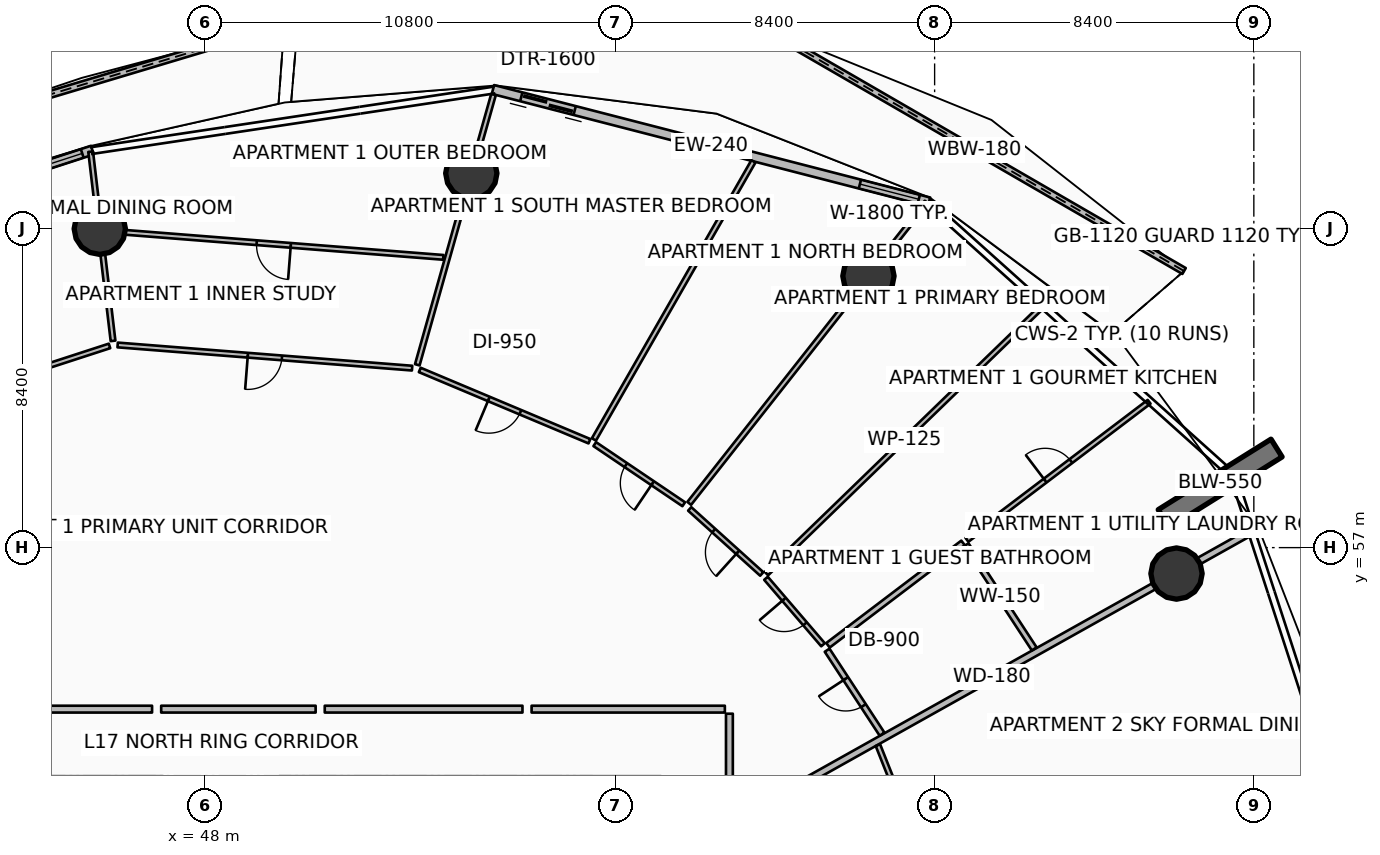
"""IFC4 building model, lengths in metres.
Left out: names, types, materials, properties, quantities, classifications, styles, units other than length and angle.
Written with IfcOpenShell. Run it as: python <this file> out.ifc"""

import sys

from ifc_helpers import new_model, si_unit, direction, frame, frame_2d, origin, origin_2d, place, context, subcontext, project, spatial, polyline, rectangle, circle, outline, extrude, element, fill, save


model = new_model("IFC4")
c1 = context("Model", 3, precision=1e-05, world=origin(), true_north=direction((0.0, 1.0)))
c2 = subcontext(c1, "Body", "Model", "MODEL_VIEW")
j1 = project(units=[si_unit("LENGTHUNIT", "METRE"), si_unit("PLANEANGLEUNIT", "RADIAN")], contexts=[c1])
p1 = place(None, origin())
s1 = spatial("IfcSite", under=j1, at=p1, CompositionType="ELEMENT")
p2 = place(p1, origin())
s2 = spatial("IfcBuilding", under=s1, at=p2, CompositionType="ELEMENT")
p3 = place(p2, frame((0.0, 0.0, 71.4)))
s3 = spatial("IfcBuildingStorey", under=s2, at=p3, CompositionType="ELEMENT", Elevation=71.4)
p4 = place(p3, frame((73.23, 57.765, 0.0), z_axis=(0.0, 0.0, 1.0), x_axis=(0.848053161125, 0.529911158502, 0.0)))
e1 = element("IfcWall", 1, at=p4, inside=s3, PredefinedType="SOLIDWALL", context=c2, shape_type="SweptSolid", body=[
    extrude(rectangle(XDim=3.5, YDim=0.55, at=frame_2d((1.75, 0.0))), origin(), (0.0, 0.0, 1.0), 3.75),
])
p5 = place(p3, frame((73.565, 56.317, 0.0), z_axis=(-0.395060386522, -0.22124681186, 0.891614905238), x_axis=(0.488625217479, -0.872493780404, 0.0)))
e2 = element("IfcColumn", 2, at=p5, inside=s3, PredefinedType="COLUMN", context=c2, shape_type="SweptSolid", body=[
    extrude(circle(Radius=0.675, at=origin_2d()), origin(), (0.0, 0.0, 1.0), 3.757),
])
p6 = place(p3, frame((65.458, 64.146, 0.0), z_axis=(-0.271840819549, -0.344907860641, 0.898410338595), x_axis=(0.785386244622, -0.619006015123, 0.0)))
e3 = element("IfcColumn", 3, at=p6, inside=s3, PredefinedType="COLUMN", context=c2, shape_type="SweptSolid", body=[
    extrude(circle(Radius=0.675, at=origin_2d()), origin(), (0.0, 0.0, 1.0), 3.729),
])
p7 = place(p3, frame((55.008, 66.849, 0.0), z_axis=(-0.110887123569, -0.393127114754, 0.912773311108), x_axis=(0.962446403038, -0.271471768843, 0.0)))
e4 = element("IfcColumn", 4, at=p7, inside=s3, PredefinedType="COLUMN", context=c2, shape_type="SweptSolid", body=[
    extrude(circle(Radius=0.675, at=origin_2d()), origin(), (0.0, 0.0, 1.0), 3.67),
])
p8 = place(p3, frame((45.232, 65.389, 0.0), z_axis=(0.044395335114, -0.375336245044, 0.925824906435), x_axis=(0.993077298067, 0.117462675198, 0.0)))
e5 = element("IfcColumn", 5, at=p8, inside=s3, PredefinedType="COLUMN", context=c2, shape_type="SweptSolid", body=[
    extrude(circle(Radius=0.675, at=origin_2d()), origin(), (0.0, 0.0, 1.0), 3.618),
])
p9 = place(p3, frame((73.764, 64.278, 0.0), z_axis=(0.0, 0.0, 1.0), x_axis=(-0.865601166392, 0.500734081865, 0.0)))
e6 = element("IfcWall", 6, at=p9, inside=s3, PredefinedType="PARAPET", context=c2, shape_type="SweptSolid", body=[
    extrude(outline(polyline([(0.0, 0.0), (12.74, 0.0), (12.74, 1.832), (6.37, 1.853), (0.0, 1.756), (0.0, 0.0)])), frame((0.0, 0.09, 0.0), z_axis=(0.0, -1.0, 0.0), x_axis=(1.0, 0.0, 0.0)), (0.0, 0.0, 1.0), 0.18),
])
p10 = place(p3, frame((50.087, 70.771, 0.0), z_axis=(0.0, 0.0, 1.0), x_axis=(-0.957966698042, -0.286879426664, 0.0)))
e7 = element("IfcWall", 7, at=p10, inside=s3, PredefinedType="PARAPET", context=c2, shape_type="SweptSolid", body=[
    extrude(outline(polyline([(0.0, 0.0), (10.759, 0.0), (10.759, 1.148), (5.379, 1.284), (0.0, 1.483), (0.0, 0.0)])), frame((0.0, 0.09, 0.0), z_axis=(0.0, -1.0, 0.0), x_axis=(1.0, 0.0, 0.0)), (0.0, 0.0, 1.0), 0.18),
])
p11 = place(p3, frame((67.054, 66.096, 0.0), z_axis=(0.0, 0.0, 1.0), x_axis=(-0.96833871487, 0.249640007378, 0.0)))
e8 = element("IfcWall", 8, at=p11, inside=s3, PredefinedType="SOLIDWALL", context=c2, shape_type="SweptSolid", body=[
    extrude(rectangle(XDim=11.851, YDim=0.24, at=frame_2d((5.926, 0.0))), origin(), (0.0, 0.0, 1.0), 2.3),
])
p12 = place(p11, frame((9.631, 0.0, 0.0)))
e9 = element("IfcOpeningElement", 9, at=p12, cuts=e8, PredefinedType="OPENING", context=c2, shape_type="SweptSolid", body=[
    extrude(rectangle(XDim=1.45, YDim=2.15, at=frame_2d((0.725, 1.075))), frame((0.0, 0.13, 0.0), z_axis=(0.0, -1.0, 0.0), x_axis=(1.0, 0.0, 0.0)), (0.0, 0.0, 1.0), 0.26),
])
p13 = place(p11, frame((0.28, 0.0, 0.65)))
e10 = element("IfcOpeningElement", 10, at=p13, cuts=e8, PredefinedType="OPENING", context=c2, shape_type="SweptSolid", body=[
    extrude(rectangle(XDim=1.6, YDim=1.5, at=frame_2d((0.8, 0.75))), frame((0.0, 0.13, 0.0), z_axis=(0.0, -1.0, 0.0), x_axis=(1.0, 0.0, 0.0)), (0.0, 0.0, 1.0), 0.26),
])
p14 = place(p3, frame((45.036, 67.458, 0.0), z_axis=(0.0, 0.0, 1.0), x_axis=(-0.951054679225, -0.309022648238, 0.0)))
e11 = element("IfcWall", 11, at=p14, inside=s3, PredefinedType="SOLIDWALL", context=c2, shape_type="SweptSolid", body=[
    extrude(rectangle(XDim=10.097, YDim=0.24, at=frame_2d((5.048, 0.0))), origin(), (0.0, 0.0, 1.0), 2.3),
])
p15 = place(p14, frame((7.877, 0.0, 0.0)))
e12 = element("IfcOpeningElement", 12, at=p15, cuts=e11, PredefinedType="OPENING", context=c2, shape_type="SweptSolid", body=[
    extrude(rectangle(XDim=1.45, YDim=2.15, at=frame_2d((0.725, 1.075))), frame((0.0, 0.13, 0.0), z_axis=(0.0, -1.0, 0.0), x_axis=(1.0, 0.0, 0.0)), (0.0, 0.0, 1.0), 0.26),
])
p16 = place(p14, frame((0.28, 0.0, 0.65)))
e13 = element("IfcOpeningElement", 13, at=p16, cuts=e11, PredefinedType="OPENING", context=c2, shape_type="SweptSolid", body=[
    extrude(rectangle(XDim=1.6, YDim=1.5, at=frame_2d((0.8, 0.75))), frame((0.0, 0.13, 0.0), z_axis=(0.0, -1.0, 0.0), x_axis=(1.0, 0.0, 0.0)), (0.0, 0.0, 1.0), 0.26),
])
p17 = place(p3, frame((61.896, 49.782, 0.0), z_axis=(0.0, 0.0, 1.0), x_axis=(0.872493215695, 0.488626225828, 0.0)))
e14 = element("IfcWall", 14, at=p17, inside=s3, PredefinedType="PARTITIONING", context=c2, shape_type="SweptSolid", body=[
    extrude(rectangle(XDim=15.612, YDim=0.18, at=frame_2d((7.806, 0.0))), origin(), (0.0, 0.0, 1.0), 2.307),
])
p18 = place(p3, frame((61.8, 49.848, 0.0), z_axis=(0.0, 0.0, 1.0), x_axis=(0.0, 1.0, 0.0)))
e15 = element("IfcWall", 15, at=p18, inside=s3, PredefinedType="PARTITIONING", context=c2, shape_type="SweptSolid", body=[
    extrude(rectangle(XDim=2.781, YDim=0.18, at=frame_2d((1.391, 0.0))), origin(), (0.0, 0.0, 1.0), 2.307),
])
p19 = place(p3, frame((61.68, 52.75, 0.0), z_axis=(0.0, 0.0, 1.0), x_axis=(-1.0, 0.0, 0.0)))
e16 = element("IfcWall", 16, at=p19, inside=s3, PredefinedType="PARTITIONING", context=c2, shape_type="SweptSolid", body=[
    extrude(rectangle(XDim=5.085, YDim=0.18, at=frame_2d((2.543, 0.0))), origin(), (0.0, 0.0, 1.0), 2.307),
])
p20 = place(p3, frame((65.816, 52.092, 0.0), z_axis=(0.0, 0.0, 1.0), x_axis=(-0.547635625156, 0.836716930664, 0.0)))
e17 = element("IfcWall", 17, at=p20, inside=s3, PredefinedType="PARTITIONING", context=c2, shape_type="SweptSolid", body=[
    extrude(rectangle(XDim=2.639, YDim=0.15, at=frame_2d((1.32, 0.0))), origin(), (0.0, 0.0, 1.0), 2.307),
])
p21 = place(p20, frame((0.895, 0.0, 0.0)))
e18 = element("IfcOpeningElement", 18, at=p21, cuts=e17, PredefinedType="OPENING", context=c2, shape_type="SweptSolid", body=[
    extrude(rectangle(XDim=0.85, YDim=2.06, at=frame_2d((0.425, 1.03))), frame((0.0, 0.085, 0.0), z_axis=(0.0, -1.0, 0.0), x_axis=(1.0, 0.0, 0.0)), (0.0, 0.0, 1.0), 0.17),
])
p22 = place(p3, frame((69.821, 54.335, 0.0), z_axis=(0.0, 0.0, 1.0), x_axis=(-0.547709492592, 0.836668579382, 0.0)))
e19 = element("IfcWall", 19, at=p22, inside=s3, PredefinedType="PARTITIONING", context=c2, shape_type="SweptSolid", body=[
    extrude(rectangle(XDim=3.273, YDim=0.15, at=frame_2d((1.637, 0.0))), origin(), (0.0, 0.0, 1.0), 2.307),
])
p23 = place(p3, frame((64.394, 54.43, 0.0), z_axis=(0.0, 0.0, 1.0), x_axis=(0.796855751732, 0.604169604442, 0.0)))
e20 = element("IfcWall", 20, at=p23, inside=s3, PredefinedType="PARTITIONING", context=c2, shape_type="SweptSolid", body=[
    extrude(rectangle(XDim=4.46, YDim=0.15, at=frame_2d((2.23, 0.0))), origin(), (0.0, 0.0, 1.0), 2.79),
])
p24 = place(p3, frame((68.051, 57.203, 0.0), z_axis=(0.0, 0.0, 1.0), x_axis=(0.796847589026, 0.604180370307, 0.0)))
e21 = element("IfcWall", 21, at=p24, inside=s3, PredefinedType="PARTITIONING", context=c2, shape_type="SweptSolid", body=[
    extrude(rectangle(XDim=6.015, YDim=0.125, at=frame_2d((3.008, 0.0))), origin(), (0.0, 0.0, 1.0), 2.325),
])
p25 = place(p24, frame((2.583, 0.0, 0.0)))
e22 = element("IfcOpeningElement", 22, at=p25, cuts=e21, PredefinedType="OPENING", context=c2, shape_type="SweptSolid", body=[
    extrude(rectangle(XDim=0.85, YDim=2.06, at=frame_2d((0.425, 1.03))), frame((0.0, 0.073, 0.0), z_axis=(0.0, -1.0, 0.0), x_axis=(1.0, 0.0, 0.0)), (0.0, 0.0, 1.0), 0.145),
])
p26 = place(p3, frame((62.775, 56.316, 0.0), z_axis=(0.0, 0.0, 1.0), x_axis=(0.718182919159, 0.695854363088, 0.0)))
e23 = element("IfcWall", 23, at=p26, inside=s3, PredefinedType="PARTITIONING", context=c2, shape_type="SweptSolid", body=[
    extrude(rectangle(XDim=10.114, YDim=0.125, at=frame_2d((5.057, 0.0))), origin(), (0.0, 0.0, 1.0), 2.325),
])
p27 = place(p3, frame((64.263, 54.444, 0.0), z_axis=(0.0, 0.0, 1.0), x_axis=(-0.651227570151, 0.758882502022, 0.0)))
e24 = element("IfcWall", 24, at=p27, inside=s3, PredefinedType="PARTITIONING", context=c2, shape_type="SweptSolid", body=[
    extrude(rectangle(XDim=2.304, YDim=0.125, at=frame_2d((1.152, 0.0))), origin(), (0.0, 0.0, 1.0), 2.79),
])
p28 = place(p27, frame((0.727, 0.0, 0.0)))
e25 = element("IfcOpeningElement", 25, at=p28, cuts=e24, PredefinedType="OPENING", context=c2, shape_type="SweptSolid", body=[
    extrude(rectangle(XDim=0.85, YDim=2.06, at=frame_2d((0.425, 1.03))), frame((0.0, 0.073, 0.0), z_axis=(0.0, -1.0, 0.0), x_axis=(1.0, 0.0, 0.0)), (0.0, 0.0, 1.0), 0.145),
])
p29 = place(p3, frame((62.651, 56.307, 0.0), z_axis=(0.0, 0.0, 1.0), x_axis=(-0.742266720662, 0.670104555571, 0.0)))
e26 = element("IfcWall", 26, at=p29, inside=s3, PredefinedType="PARTITIONING", context=c2, shape_type="SweptSolid", body=[
    extrude(rectangle(XDim=2.554, YDim=0.125, at=frame_2d((1.277, 0.0))), origin(), (0.0, 0.0, 1.0), 2.307),
])
p30 = place(p29, frame((0.852, 0.0, 0.0)))
e27 = element("IfcOpeningElement", 27, at=p30, cuts=e26, PredefinedType="OPENING", context=c2, shape_type="SweptSolid", body=[
    extrude(rectangle(XDim=0.85, YDim=2.06, at=frame_2d((0.425, 1.03))), frame((0.0, 0.073, 0.0), z_axis=(0.0, -1.0, 0.0), x_axis=(1.0, 0.0, 0.0)), (0.0, 0.0, 1.0), 0.145),
])
p31 = place(p3, frame((56.354, 52.75, 0.0), z_axis=(0.0, 0.0, 1.0), x_axis=(-1.0, 0.0, 0.0)))
e28 = element("IfcWall", 28, at=p31, inside=s3, PredefinedType="PARTITIONING", context=c2, shape_type="SweptSolid", body=[
    extrude(rectangle(XDim=5.203, YDim=0.18, at=frame_2d((2.601, 0.0))), origin(), (0.0, 0.0, 1.0), 2.307),
])
p32 = place(p3, frame((60.743, 58.164, 0.0), z_axis=(0.0, 0.0, 1.0), x_axis=(0.61907620874, 0.785330916093, 0.0)))
e29 = element("IfcWall", 29, at=p32, inside=s3, PredefinedType="PARTITIONING", context=c2, shape_type="SweptSolid", body=[
    extrude(rectangle(XDim=10.091, YDim=0.125, at=frame_2d((5.046, 0.0))), origin(), (0.0, 0.0, 1.0), 2.307),
])
p33 = place(p3, frame((58.235, 59.846, 0.0), z_axis=(0.0, 0.0, 1.0), x_axis=(0.497506673172, 0.867460149027, 0.0)))
e30 = element("IfcWall", 30, at=p33, inside=s3, PredefinedType="PARTITIONING", context=c2, shape_type="SweptSolid", body=[
    extrude(rectangle(XDim=8.435, YDim=0.125, at=frame_2d((4.218, 0.0))), origin(), (0.0, 0.0, 1.0), 2.325),
])
p34 = place(p3, frame((60.598, 58.142, 0.0), z_axis=(0.0, 0.0, 1.0), x_axis=(-0.828618216794, 0.559814121648, 0.0)))
e31 = element("IfcWall", 31, at=p34, inside=s3, PredefinedType="PARTITIONING", context=c2, shape_type="SweptSolid", body=[
    extrude(rectangle(XDim=2.825, YDim=0.125, at=frame_2d((1.413, 0.0))), origin(), (0.0, 0.0, 1.0), 2.307),
])
p35 = place(p34, frame((0.988, 0.0, 0.0)))
e32 = element("IfcOpeningElement", 32, at=p35, cuts=e31, PredefinedType="OPENING", context=c2, shape_type="SweptSolid", body=[
    extrude(rectangle(XDim=0.85, YDim=2.06, at=frame_2d((0.425, 1.03))), frame((0.0, 0.073, 0.0), z_axis=(0.0, -1.0, 0.0), x_axis=(1.0, 0.0, 0.0)), (0.0, 0.0, 1.0), 0.145),
])
p36 = place(p3, frame((58.117, 59.799, 0.0), z_axis=(0.0, 0.0, 1.0), x_axis=(-0.921919817634, 0.387380755657, 0.0)))
e33 = element("IfcWall", 33, at=p36, inside=s3, PredefinedType="PARTITIONING", context=c2, shape_type="SweptSolid", body=[
    extrude(rectangle(XDim=4.843, YDim=0.125, at=frame_2d((2.421, 0.0))), origin(), (0.0, 0.0, 1.0), 2.307),
])
p37 = place(p36, frame((1.971, 0.0, 0.0)))
e34 = element("IfcOpeningElement", 34, at=p37, cuts=e33, PredefinedType="OPENING", context=c2, shape_type="SweptSolid", body=[
    extrude(rectangle(XDim=0.9, YDim=2.08, at=frame_2d((0.45, 1.04))), frame((0.0, 0.073, 0.0), z_axis=(0.0, -1.0, 0.0), x_axis=(1.0, 0.0, 0.0)), (0.0, 0.0, 1.0), 0.145),
])
p38 = place(p3, frame((50.912, 52.75, 0.0), z_axis=(0.0, 0.0, 1.0), x_axis=(-1.0, 0.0, 0.0)))
e35 = element("IfcWall", 35, at=p38, inside=s3, PredefinedType="PARTITIONING", context=c2, shape_type="SweptSolid", body=[
    extrude(rectangle(XDim=4.064, YDim=0.18, at=frame_2d((2.032, 0.0))), origin(), (0.0, 0.0, 1.0), 2.307),
])
p39 = place(p3, frame((53.587, 61.81, 0.0), z_axis=(0.0, 0.0, 1.0), x_axis=(0.271464088879, 0.962448569249, 0.0)))
e36 = element("IfcWall", 36, at=p39, inside=s3, PredefinedType="PARTITIONING", context=c2, shape_type="SweptSolid", body=[
    extrude(rectangle(XDim=7.389, YDim=0.125, at=frame_2d((3.695, 0.0))), origin(), (0.0, 0.0, 1.0), 2.307),
])
p40 = place(p3, frame((53.45, 61.723, 0.0), z_axis=(0.0, 0.0, 1.0), x_axis=(-0.996916540968, 0.078469168116, 0.0)))
e37 = element("IfcWall", 37, at=p40, inside=s3, PredefinedType="PARTITIONING", context=c2, shape_type="SweptSolid", body=[
    extrude(rectangle(XDim=7.772, YDim=0.125, at=frame_2d((3.886, 0.0))), origin(), (0.0, 0.0, 1.0), 2.307),
])
p41 = place(p40, frame((3.436, 0.0, 0.0)))
e38 = element("IfcOpeningElement", 38, at=p41, cuts=e37, PredefinedType="OPENING", context=c2, shape_type="SweptSolid", body=[
    extrude(rectangle(XDim=0.9, YDim=2.08, at=frame_2d((0.45, 1.04))), frame((0.0, 0.073, 0.0), z_axis=(0.0, -1.0, 0.0), x_axis=(1.0, 0.0, 0.0)), (0.0, 0.0, 1.0), 0.145),
])
p42 = place(p3, frame((54.272, 64.637, 0.0), z_axis=(0.0, 0.0, 1.0), x_axis=(-0.996918214724, 0.078447900871, 0.0)))
e39 = element("IfcWall", 39, at=p42, inside=s3, PredefinedType="PARTITIONING", context=c2, shape_type="SweptSolid", body=[
    extrude(rectangle(XDim=8.954, YDim=0.125, at=frame_2d((4.477, 0.0))), origin(), (0.0, 0.0, 1.0), 2.307),
])
p43 = place(p42, frame((4.027, 0.0, 0.0)))
e40 = element("IfcOpeningElement", 40, at=p43, cuts=e39, PredefinedType="OPENING", context=c2, shape_type="SweptSolid", body=[
    extrude(rectangle(XDim=0.9, YDim=2.08, at=frame_2d((0.45, 1.04))), frame((0.0, 0.073, 0.0), z_axis=(0.0, -1.0, 0.0), x_axis=(1.0, 0.0, 0.0)), (0.0, 0.0, 1.0), 0.145),
])
p44 = place(p3, frame((46.608, 52.75, 0.0), z_axis=(0.0, 0.0, 1.0), x_axis=(-1.0, 0.0, 0.0)))
e41 = element("IfcWall", 41, at=p44, inside=s3, PredefinedType="PARTITIONING", context=c2, shape_type="SweptSolid", body=[
    extrude(rectangle(XDim=4.508, YDim=0.18, at=frame_2d((2.254, 0.0))), origin(), (0.0, 0.0, 1.0), 2.307),
])
p45 = place(p3, frame((45.581, 62.44, 0.0), z_axis=(0.0, 0.0, 1.0), x_axis=(-0.117522242016, 0.993070250602, 0.0)))
e42 = element("IfcWall", 42, at=p45, inside=s3, PredefinedType="PARTITIONING", context=c2, shape_type="SweptSolid", body=[
    extrude(rectangle(XDim=5.013, YDim=0.125, at=frame_2d((2.506, 0.0))), origin(), (0.0, 0.0, 1.0), 2.307),
])
p46 = place(p3, frame((45.488, 62.307, 0.0), z_axis=(0.0, 0.0, 1.0), x_axis=(-0.951058997127, -0.309009359055, 0.0)))
e43 = element("IfcWall", 43, at=p46, inside=s3, PredefinedType="PARTITIONING", context=c2, shape_type="SweptSolid", body=[
    extrude(rectangle(XDim=7.772, YDim=0.125, at=frame_2d((3.886, 0.0))), origin(), (0.0, 0.0, 1.0), 2.307),
])
p47 = place(p46, frame((3.436, 0.0, 0.0)))
e44 = element("IfcOpeningElement", 44, at=p47, cuts=e43, PredefinedType="OPENING", context=c2, shape_type="SweptSolid", body=[
    extrude(rectangle(XDim=0.9, YDim=2.08, at=frame_2d((0.45, 1.04))), frame((0.0, 0.073, 0.0), z_axis=(0.0, -1.0, 0.0), x_axis=(1.0, 0.0, 0.0)), (0.0, 0.0, 1.0), 0.145),
])
p48 = place(p3, frame((67.611, 47.019, 0.0), z_axis=(0.0, 0.0, 1.0), x_axis=(-0.36955872322, 0.929207377334, 0.0)))
e45 = element("IfcWall", 45, at=p48, inside=s3, PredefinedType="PARTITIONING", context=c2, shape_type="SweptSolid", body=[
    extrude(rectangle(XDim=5.149, YDim=0.125, at=frame_2d((2.574, 0.0))), origin(), (0.0, 0.0, 1.0), 2.307),
])
p49 = place(p48, frame((2.125, 0.0, 0.0)))
e46 = element("IfcOpeningElement", 46, at=p49, cuts=e45, PredefinedType="OPENING", context=c2, shape_type="SweptSolid", body=[
    extrude(rectangle(XDim=0.9, YDim=2.08, at=frame_2d((0.45, 1.04))), frame((0.0, 0.073, 0.0), z_axis=(0.0, -1.0, 0.0), x_axis=(1.0, 0.0, 0.0)), (0.0, 0.0, 1.0), 0.145),
])
p50 = place(p12, origin())
e47 = element("IfcDoor", 47, at=p50, inside=s3, OperationType="DOUBLE_DOOR_SLIDING", PredefinedType="DOOR", context=c2, shape_type="SweptSolid", body=[
    extrude(rectangle(XDim=1.45, YDim=2.15, at=frame_2d((0.725, 1.075))), frame((0.0, 0.025, 0.0), z_axis=(0.0, -1.0, 0.0), x_axis=(1.0, 0.0, 0.0)), (0.0, 0.0, 1.0), 0.05),
])
fill(e9, e47)
p51 = place(p13, origin())
e48 = element("IfcWindow", 48, at=p51, inside=s3, PartitioningType="SINGLE_PANEL", PredefinedType="WINDOW", context=c2, shape_type="SweptSolid", body=[
    extrude(rectangle(XDim=1.6, YDim=1.5, at=frame_2d((0.8, 0.75))), frame((0.0, 0.03, 0.0), z_axis=(0.0, -1.0, 0.0), x_axis=(1.0, 0.0, 0.0)), (0.0, 0.0, 1.0), 0.06),
])
fill(e10, e48)
p52 = place(p16, origin())
e49 = element("IfcWindow", 49, at=p52, inside=s3, PartitioningType="SINGLE_PANEL", PredefinedType="WINDOW", context=c2, shape_type="SweptSolid", body=[
    extrude(rectangle(XDim=1.6, YDim=1.5, at=frame_2d((0.8, 0.75))), frame((0.0, 0.03, 0.0), z_axis=(0.0, -1.0, 0.0), x_axis=(1.0, 0.0, 0.0)), (0.0, 0.0, 1.0), 0.06),
])
fill(e13, e49)
p53 = place(p21, origin())
e50 = element("IfcDoor", 50, at=p53, inside=s3, OperationType="SINGLE_SWING_RIGHT", PredefinedType="DOOR", context=c2, shape_type="SweptSolid", body=[
    extrude(rectangle(XDim=0.85, YDim=2.06, at=frame_2d((0.425, 1.03))), frame((0.0, 0.025, 0.0), z_axis=(0.0, -1.0, 0.0), x_axis=(1.0, 0.0, 0.0)), (0.0, 0.0, 1.0), 0.05),
])
fill(e18, e50)
p54 = place(p25, origin())
e51 = element("IfcDoor", 51, at=p54, inside=s3, OperationType="SINGLE_SWING_LEFT", PredefinedType="DOOR", context=c2, shape_type="SweptSolid", body=[
    extrude(rectangle(XDim=0.85, YDim=2.06, at=frame_2d((0.425, 1.03))), frame((0.0, 0.025, 0.0), z_axis=(0.0, -1.0, 0.0), x_axis=(1.0, 0.0, 0.0)), (0.0, 0.0, 1.0), 0.05),
])
fill(e22, e51)
p55 = place(p28, origin())
e52 = element("IfcDoor", 52, at=p55, inside=s3, OperationType="SINGLE_SWING_RIGHT", PredefinedType="DOOR", context=c2, shape_type="SweptSolid", body=[
    extrude(rectangle(XDim=0.85, YDim=2.06, at=frame_2d((0.425, 1.03))), frame((0.0, 0.025, 0.0), z_axis=(0.0, -1.0, 0.0), x_axis=(1.0, 0.0, 0.0)), (0.0, 0.0, 1.0), 0.05),
])
fill(e25, e52)
p56 = place(p30, origin())
e53 = element("IfcDoor", 53, at=p56, inside=s3, OperationType="SINGLE_SWING_LEFT", PredefinedType="DOOR", context=c2, shape_type="SweptSolid", body=[
    extrude(rectangle(XDim=0.85, YDim=2.06, at=frame_2d((0.425, 1.03))), frame((0.0, 0.025, 0.0), z_axis=(0.0, -1.0, 0.0), x_axis=(1.0, 0.0, 0.0)), (0.0, 0.0, 1.0), 0.05),
])
fill(e27, e53)
p57 = place(p35, origin())
e54 = element("IfcDoor", 54, at=p57, inside=s3, OperationType="SINGLE_SWING_LEFT", PredefinedType="DOOR", context=c2, shape_type="SweptSolid", body=[
    extrude(rectangle(XDim=0.85, YDim=2.06, at=frame_2d((0.425, 1.03))), frame((0.0, 0.025, 0.0), z_axis=(0.0, -1.0, 0.0), x_axis=(1.0, 0.0, 0.0)), (0.0, 0.0, 1.0), 0.05),
])
fill(e32, e54)
p58 = place(p37, origin())
e55 = element("IfcDoor", 55, at=p58, inside=s3, OperationType="SINGLE_SWING_RIGHT", PredefinedType="DOOR", context=c2, shape_type="SweptSolid", body=[
    extrude(rectangle(XDim=0.9, YDim=2.08, at=frame_2d((0.45, 1.04))), frame((0.0, 0.025, 0.0), z_axis=(0.0, -1.0, 0.0), x_axis=(1.0, 0.0, 0.0)), (0.0, 0.0, 1.0), 0.05),
])
fill(e34, e55)
p59 = place(p41, origin())
e56 = element("IfcDoor", 56, at=p59, inside=s3, OperationType="SINGLE_SWING_RIGHT", PredefinedType="DOOR", context=c2, shape_type="SweptSolid", body=[
    extrude(rectangle(XDim=0.9, YDim=2.08, at=frame_2d((0.45, 1.04))), frame((0.0, 0.025, 0.0), z_axis=(0.0, -1.0, 0.0), x_axis=(1.0, 0.0, 0.0)), (0.0, 0.0, 1.0), 0.05),
])
fill(e38, e56)
p60 = place(p43, origin())
e57 = element("IfcDoor", 57, at=p60, inside=s3, OperationType="SINGLE_SWING_LEFT", PredefinedType="DOOR", context=c2, shape_type="SweptSolid", body=[
    extrude(rectangle(XDim=0.9, YDim=2.08, at=frame_2d((0.45, 1.04))), frame((0.0, 0.025, 0.0), z_axis=(0.0, -1.0, 0.0), x_axis=(1.0, 0.0, 0.0)), (0.0, 0.0, 1.0), 0.05),
])
fill(e40, e57)
save(model, sys.argv[1])
